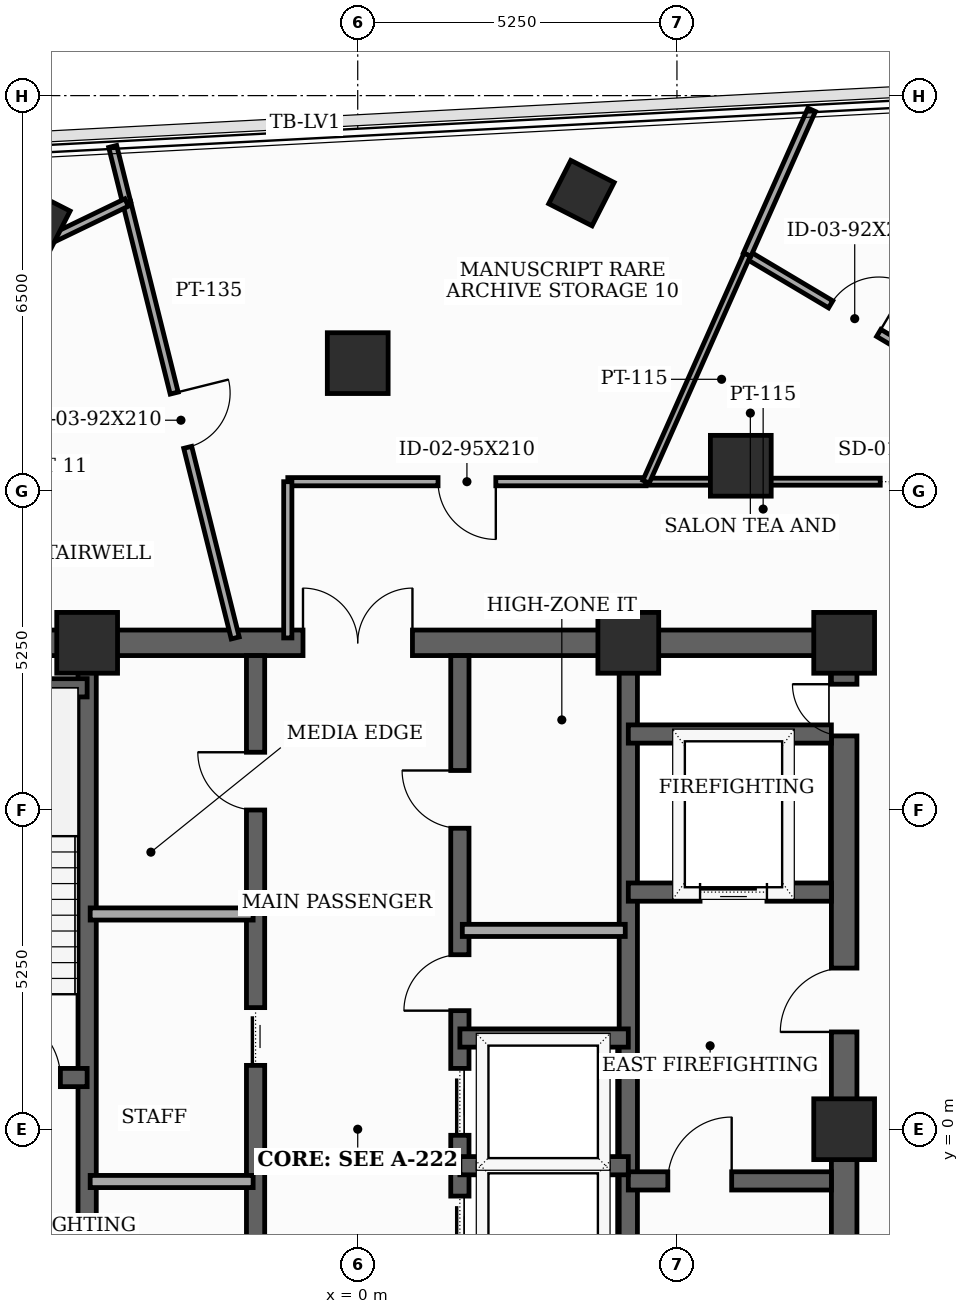
"""IFC4 building model, lengths in metres.
Left out: names, types, materials, properties, quantities, classifications, styles, units other than length and angle.
Written with IfcOpenShell. Run it as: python <this file> out.ifc"""

import sys

from ifc_helpers import new_model, si_unit, direction, frame, frame_2d, origin, origin_2d, place, context, subcontext, project, spatial, rectangle, extrude, element, fill, save


model = new_model("IFC4")
c1 = context("Model", 3, precision=1e-05, world=origin(), true_north=direction((0.0, 1.0)))
c2 = subcontext(c1, "Body", "Model", "MODEL_VIEW")
j1 = project(units=[si_unit("LENGTHUNIT", "METRE"), si_unit("PLANEANGLEUNIT", "RADIAN")], contexts=[c1])
p1 = place(None, origin())
s1 = spatial("IfcSite", under=j1, at=p1, CompositionType="ELEMENT")
p2 = place(p1, origin())
s2 = spatial("IfcBuilding", under=s1, at=p2, CompositionType="ELEMENT")
p3 = place(p2, frame((0.0, 0.0, 255.9)))
s3 = spatial("IfcBuildingStorey", under=s2, at=p3, CompositionType="ELEMENT", Elevation=255.9)
for number, where, z_axis, x_axis in (
    (1, (8.0, 0.0, 0.0), (0.0, 0.0, 1.0), (1.0, 0.0, 0.0)),
    (2, (8.0, 8.0, 0.0), (0.0, 0.0, 1.0), (1.0, 0.0, 0.0)),
    (3, (4.45, 8.0, 0.0), (0.0, 0.0, 1.0), (1.0, 0.0, 0.0)),
    (4, (-4.45, 8.0, 0.0), (0.0, 0.0, 1.0), (1.0, 0.0, 0.0)),
    (5, (6.3, 10.912, 0.0), (0.0, 0.0, 1.0), (1.0, 0.0, 0.0)),
    (6, (0.0, 12.6, 0.0), (0.0, 0.0, 1.0), (1.0, 0.0, 0.0)),
):
    element("IfcColumn", number, at=place(p3, frame(where, z_axis=z_axis, x_axis=x_axis)), inside=s3, PredefinedType="COLUMN", context=c2, shape_type="SweptSolid", body=[
        extrude(rectangle(XDim=1.0, YDim=1.0, at=origin_2d()), origin(), (0.0, 0.0, 1.0), 3.7),
    ])
for number, where, z_axis, x_axis in (
    (7, (3.679, 15.396, 0.0), (0.0, 0.0, 1.0), (0.454, 0.891, 0.0)),
    (8, (-5.269, 14.927, 0.0), (0.0, 0.0, 1.0), (0.454, 0.891, 0.0)),
):
    element("IfcColumn", number, at=place(p3, frame(where, z_axis=z_axis, x_axis=x_axis)), inside=s3, PredefinedType="COLUMN", context=c2, shape_type="SweptSolid", body=[
        extrude(rectangle(XDim=0.8, YDim=0.8, at=origin_2d()), origin(), (0.0, 0.0, 1.0), 3.7),
    ])
p4 = place(p3, frame((8.0, -8.0, 0.0), z_axis=(0.0, 0.0, 1.0), x_axis=(0.0, 1.0, 0.0)))
e9 = element("IfcWall", 9, at=p4, inside=s3, PredefinedType="SHEAR", context=c2, shape_type="SweptSolid", body=[
    extrude(rectangle(XDim=16.0, YDim=0.42, at=frame_2d((8.0, 0.0))), origin(), (0.0, 0.0, 1.0), 3.5),
])
p5 = place(p4, frame((9.6, 0.0, 0.0)))
e10 = element("IfcOpeningElement", 10, at=p5, cuts=e9, PredefinedType="OPENING", context=c2, shape_type="SweptSolid", body=[
    extrude(rectangle(XDim=1.05, YDim=2.15, at=frame_2d((0.525, 1.075))), frame((0.0, 0.22, 0.0), z_axis=(0.0, -1.0, 0.0), x_axis=(1.0, 0.0, 0.0)), (0.0, 0.0, 1.0), 0.44),
])
p6 = place(p4, frame((14.469, 0.0, 0.0)))
e11 = element("IfcOpeningElement", 11, at=p6, cuts=e9, PredefinedType="OPENING", context=c2, shape_type="SweptSolid", body=[
    extrude(rectangle(XDim=0.85, YDim=2.02, at=frame_2d((0.425, 1.01))), frame((0.0, 0.22, 0.0), z_axis=(0.0, -1.0, 0.0), x_axis=(1.0, 0.0, 0.0)), (0.0, 0.0, 1.0), 0.44),
])
p7 = place(p3, frame((-8.0, 8.0, 0.0), z_axis=(0.0, 0.0, 1.0), x_axis=(1.0, 0.0, 0.0)))
e12 = element("IfcWall", 12, at=p7, inside=s3, PredefinedType="SHEAR", context=c2, shape_type="SweptSolid", body=[
    extrude(rectangle(XDim=16.0, YDim=0.42, at=frame_2d((8.0, 0.0))), origin(), (0.0, 0.0, 1.0), 3.5),
])
p8 = place(p7, frame((7.1, 0.0, 0.0)))
e13 = element("IfcOpeningElement", 13, at=p8, cuts=e12, PredefinedType="OPENING", context=c2, shape_type="SweptSolid", body=[
    extrude(rectangle(XDim=1.8, YDim=2.15, at=frame_2d((0.9, 1.075))), frame((0.0, 0.22, 0.0), z_axis=(0.0, -1.0, 0.0), x_axis=(1.0, 0.0, 0.0)), (0.0, 0.0, 1.0), 0.44),
])
for number, where, z_axis, x_axis in (
    (14, (-4.45, -7.79, 0.0), (0.0, 0.0, 1.0), (0.0, 1.0, 0.0)),
    (15, (4.45, -7.79, 0.0), (0.0, 0.0, 1.0), (0.0, 1.0, 0.0)),
):
    element("IfcWall", number, at=place(p3, frame(where, z_axis=z_axis, x_axis=x_axis)), inside=s3, PredefinedType="SHEAR", context=c2, shape_type="SweptSolid", body=[
        extrude(rectangle(XDim=15.58, YDim=0.3, at=frame_2d((7.79, 0.0))), origin(), (0.0, 0.0, 1.0), 3.5),
    ])
p9 = place(p3, frame((-7.79, 0.85, 0.0), z_axis=(0.0, 0.0, 1.0), x_axis=(1.0, 0.0, 0.0)))
e16 = element("IfcWall", 16, at=p9, inside=s3, PredefinedType="SHEAR", context=c2, shape_type="SweptSolid", body=[
    extrude(rectangle(XDim=3.34, YDim=0.3, at=frame_2d((1.67, 0.0))), origin(), (0.0, 0.0, 1.0), 3.5),
])
p10 = place(p9, frame((1.85, 0.0, 0.0)))
e17 = element("IfcOpeningElement", 17, at=p10, cuts=e16, PredefinedType="OPENING", context=c2, shape_type="SweptSolid", body=[
    extrude(rectangle(XDim=1.05, YDim=2.15, at=frame_2d((0.525, 1.075))), frame((0.0, 0.16, 0.0), z_axis=(0.0, -1.0, 0.0), x_axis=(1.0, 0.0, 0.0)), (0.0, 0.0, 1.0), 0.32),
])
p11 = place(p3, frame((-7.79, 7.26, 0.0), z_axis=(0.0, 0.0, 1.0), x_axis=(1.0, 0.0, 0.0)))
e18 = element("IfcWall", 18, at=p11, inside=s3, PredefinedType="SHEAR", context=c2, shape_type="SweptSolid", body=[
    extrude(rectangle(XDim=3.34, YDim=0.3, at=frame_2d((1.67, 0.0))), origin(), (0.0, 0.0, 1.0), 3.5),
])
p12 = place(p3, frame((4.45, -0.85, 0.0), z_axis=(0.0, 0.0, 1.0), x_axis=(1.0, 0.0, 0.0)))
e19 = element("IfcWall", 19, at=p12, inside=s3, PredefinedType="SHEAR", context=c2, shape_type="SweptSolid", body=[
    extrude(rectangle(XDim=3.34, YDim=0.3, at=frame_2d((1.67, 0.0))), origin(), (0.0, 0.0, 1.0), 3.5),
])
p13 = place(p12, frame((0.65, 0.0, 0.0)))
e20 = element("IfcOpeningElement", 20, at=p13, cuts=e19, PredefinedType="OPENING", context=c2, shape_type="SweptSolid", body=[
    extrude(rectangle(XDim=1.05, YDim=2.15, at=frame_2d((0.525, 1.075))), frame((0.0, 0.16, 0.0), z_axis=(0.0, -1.0, 0.0), x_axis=(1.0, 0.0, 0.0)), (0.0, 0.0, 1.0), 0.32),
])
p14 = place(p3, frame((4.45, 3.9, 0.0), z_axis=(0.0, 0.0, 1.0), x_axis=(1.0, 0.0, 0.0)))
e21 = element("IfcWall", 21, at=p14, inside=s3, PredefinedType="SHEAR", context=c2, shape_type="SweptSolid", body=[
    extrude(rectangle(XDim=3.34, YDim=0.3, at=frame_2d((1.67, 0.0))), origin(), (0.0, 0.0, 1.0), 3.5),
])
p15 = place(p14, frame((1.18, 0.0, 0.0)))
e22 = element("IfcOpeningElement", 22, at=p15, cuts=e21, PredefinedType="OPENING", context=c2, shape_type="SweptSolid", body=[
    extrude(rectangle(XDim=1.1, YDim=2.1, at=frame_2d((0.55, 1.05))), frame((0.0, 0.16, 0.0), z_axis=(0.0, -1.0, 0.0), x_axis=(1.0, 0.0, 0.0)), (0.0, 0.0, 1.0), 0.32),
])
p16 = place(p3, frame((4.45, 6.5, 0.0), z_axis=(0.0, 0.0, 1.0), x_axis=(1.0, 0.0, 0.0)))
e23 = element("IfcWall", 23, at=p16, inside=s3, PredefinedType="SHEAR", context=c2, shape_type="SweptSolid", body=[
    extrude(rectangle(XDim=3.34, YDim=0.3, at=frame_2d((1.67, 0.0))), origin(), (0.0, 0.0, 1.0), 3.5),
])
p17 = place(p3, frame((-1.68, -4.85, 0.0), z_axis=(0.0, 0.0, 1.0), x_axis=(0.0, 1.0, 0.0)))
e24 = element("IfcWall", 24, at=p17, inside=s3, PredefinedType="SHEAR", context=c2, shape_type="SweptSolid", body=[
    extrude(rectangle(XDim=12.64, YDim=0.3, at=frame_2d((6.32, 0.0))), origin(), (0.0, 0.0, 1.0), 3.5),
])
p18 = place(p17, frame((1.65, 0.0, 0.0)))
e25 = element("IfcOpeningElement", 25, at=p18, cuts=e24, PredefinedType="OPENING", context=c2, shape_type="SweptSolid", body=[
    extrude(rectangle(XDim=0.95, YDim=2.1, at=frame_2d((0.475, 1.05))), frame((0.0, 0.16, 0.0), z_axis=(0.0, -1.0, 0.0), x_axis=(1.0, 0.0, 0.0)), (0.0, 0.0, 1.0), 0.32),
])
p19 = place(p17, frame((5.9, 0.0, 0.0)))
e26 = element("IfcOpeningElement", 26, at=p19, cuts=e24, PredefinedType="OPENING", context=c2, shape_type="SweptSolid", body=[
    extrude(rectangle(XDim=0.95, YDim=2.1, at=frame_2d((0.475, 1.05))), frame((0.0, 0.16, 0.0), z_axis=(0.0, -1.0, 0.0), x_axis=(1.0, 0.0, 0.0)), (0.0, 0.0, 1.0), 0.32),
])
p20 = place(p17, frame((10.1, 0.0, 0.0)))
e27 = element("IfcOpeningElement", 27, at=p20, cuts=e24, PredefinedType="OPENING", context=c2, shape_type="SweptSolid", body=[
    extrude(rectangle(XDim=0.95, YDim=2.1, at=frame_2d((0.475, 1.05))), frame((0.0, 0.16, 0.0), z_axis=(0.0, -1.0, 0.0), x_axis=(1.0, 0.0, 0.0)), (0.0, 0.0, 1.0), 0.32),
])
p21 = place(p3, frame((1.68, -4.85, 0.0), z_axis=(0.0, 0.0, 1.0), x_axis=(0.0, 1.0, 0.0)))
e28 = element("IfcWall", 28, at=p21, inside=s3, PredefinedType="SHEAR", context=c2, shape_type="SweptSolid", body=[
    extrude(rectangle(XDim=12.64, YDim=0.3, at=frame_2d((6.32, 0.0))), origin(), (0.0, 0.0, 1.0), 3.5),
])
p22 = place(p21, frame((0.55, 0.0, 0.0)))
e29 = element("IfcOpeningElement", 29, at=p22, cuts=e28, PredefinedType="OPENING", context=c2, shape_type="SweptSolid", body=[
    extrude(rectangle(XDim=1.1, YDim=2.1, at=frame_2d((0.55, 1.05))), frame((0.0, 0.16, 0.0), z_axis=(0.0, -1.0, 0.0), x_axis=(1.0, 0.0, 0.0)), (0.0, 0.0, 1.0), 0.32),
])
p23 = place(p21, frame((2.65, 0.0, 0.0)))
e30 = element("IfcOpeningElement", 30, at=p23, cuts=e28, PredefinedType="OPENING", context=c2, shape_type="SweptSolid", body=[
    extrude(rectangle(XDim=1.1, YDim=2.1, at=frame_2d((0.55, 1.05))), frame((0.0, 0.16, 0.0), z_axis=(0.0, -1.0, 0.0), x_axis=(1.0, 0.0, 0.0)), (0.0, 0.0, 1.0), 0.32),
])
p24 = place(p21, frame((4.75, 0.0, 0.0)))
e31 = element("IfcOpeningElement", 31, at=p24, cuts=e28, PredefinedType="OPENING", context=c2, shape_type="SweptSolid", body=[
    extrude(rectangle(XDim=1.1, YDim=2.1, at=frame_2d((0.55, 1.05))), frame((0.0, 0.16, 0.0), z_axis=(0.0, -1.0, 0.0), x_axis=(1.0, 0.0, 0.0)), (0.0, 0.0, 1.0), 0.32),
])
p25 = place(p21, frame((6.8, 0.0, 0.0)))
e32 = element("IfcOpeningElement", 32, at=p25, cuts=e28, PredefinedType="OPENING", context=c2, shape_type="SweptSolid", body=[
    extrude(rectangle(XDim=0.92, YDim=2.1, at=frame_2d((0.46, 1.05))), frame((0.0, 0.16, 0.0), z_axis=(0.0, -1.0, 0.0), x_axis=(1.0, 0.0, 0.0)), (0.0, 0.0, 1.0), 0.32),
])
p26 = place(p21, frame((9.8, 0.0, 0.0)))
e33 = element("IfcOpeningElement", 33, at=p26, cuts=e28, PredefinedType="OPENING", context=c2, shape_type="SweptSolid", body=[
    extrude(rectangle(XDim=0.95, YDim=2.1, at=frame_2d((0.475, 1.05))), frame((0.0, 0.16, 0.0), z_axis=(0.0, -1.0, 0.0), x_axis=(1.0, 0.0, 0.0)), (0.0, 0.0, 1.0), 0.32),
])
for number, where, z_axis, x_axis in (
    (34, (1.68, 1.5, 0.0), (0.0, 0.0, 1.0), (1.0, 0.0, 0.0)),
    (35, (1.68, -0.6, 0.0), (0.0, 0.0, 1.0), (1.0, 0.0, 0.0)),
):
    element("IfcWall", number, at=place(p3, frame(where, z_axis=z_axis, x_axis=x_axis)), inside=s3, PredefinedType="SHEAR", context=c2, shape_type="SweptSolid", body=[
        extrude(rectangle(XDim=2.77, YDim=0.3, at=frame_2d((1.385, 0.0))), origin(), (0.0, 0.0, 1.0), 3.5),
    ])
for number, where, z_axis, x_axis in (
    (36, (-4.4, -0.86, 0.0), (0.0, 0.0, 1.0), (1.0, 0.0, 0.0)),
    (37, (-4.4, 3.54, 0.0), (0.0, 0.0, 1.0), (1.0, 0.0, 0.0)),
    (38, (1.72, 3.27, 0.0), (0.0, 0.0, 1.0), (1.0, 0.0, 0.0)),
):
    element("IfcWall", number, at=place(p3, frame(where, z_axis=z_axis, x_axis=x_axis)), inside=s3, PredefinedType="SOLIDWALL", context=c2, shape_type="SweptSolid", body=[
        extrude(rectangle(XDim=2.68, YDim=0.2, at=frame_2d((1.34, 0.0))), origin(), (0.0, 0.0, 1.0), 3.5),
    ])
p27 = place(p3, frame((10.15, 10.65, 0.0), z_axis=(0.0, 0.0, 1.0), x_axis=(-1.0, 0.0, 0.0)))
e39 = element("IfcWall", 39, at=p27, inside=s3, PredefinedType="PARTITIONING", context=c2, shape_type="SweptSolid", body=[
    extrude(rectangle(XDim=5.408, YDim=0.115, at=frame_2d((2.704, 0.0))), origin(), (0.0, 0.0, 1.0), 2.885),
])
p28 = place(p27, frame((0.607, 0.0, 0.0)))
e40 = element("IfcOpeningElement", 40, at=p28, cuts=e39, PredefinedType="OPENING", context=c2, shape_type="SweptSolid", body=[
    extrude(rectangle(XDim=0.95, YDim=2.1, at=frame_2d((0.475, 1.05))), frame((0.0, 0.067, 0.0), z_axis=(0.0, -1.0, 0.0), x_axis=(1.0, 0.0, 0.0)), (0.0, 0.0, 1.0), 0.135),
])
p29 = place(p3, frame((4.742, 10.65, 0.0), z_axis=(0.0, 0.0, 1.0), x_axis=(-1.0, 0.0, 0.0)))
e41 = element("IfcWall", 41, at=p29, inside=s3, PredefinedType="PARTITIONING", context=c2, shape_type="SweptSolid", body=[
    extrude(rectangle(XDim=5.892, YDim=0.135, at=frame_2d((2.946, 0.0))), origin(), (0.0, 0.0, 1.0), 2.885),
])
p30 = place(p29, frame((2.471, 0.0, 0.0)))
e42 = element("IfcOpeningElement", 42, at=p30, cuts=e41, PredefinedType="OPENING", context=c2, shape_type="SweptSolid", body=[
    extrude(rectangle(XDim=0.95, YDim=2.1, at=frame_2d((0.475, 1.05))), frame((0.0, 0.077, 0.0), z_axis=(0.0, -1.0, 0.0), x_axis=(1.0, 0.0, 0.0)), (0.0, 0.0, 1.0), 0.155),
])
p31 = place(p3, frame((-1.15, 10.65, 0.0), z_axis=(0.0, 0.0, 1.0), x_axis=(0.0, -1.0, 0.0)))
e43 = element("IfcWall", 43, at=p31, inside=s3, PredefinedType="PARTITIONING", context=c2, shape_type="SweptSolid", body=[
    extrude(rectangle(XDim=2.57, YDim=0.135, at=frame_2d((1.285, 0.0))), origin(), (0.0, 0.0, 1.0), 2.885),
])
p32 = place(p3, frame((6.404, 14.384, 0.0), z_axis=(0.0, 0.0, 1.0), x_axis=(0.859464079119, -0.511196143085, 0.0)))
e44 = element("IfcWall", 44, at=p32, inside=s3, PredefinedType="PARTITIONING", context=c2, shape_type="SweptSolid", body=[
    extrude(rectangle(XDim=4.118, YDim=0.135, at=frame_2d((2.059, 0.0))), origin(), (0.0, 0.0, 1.0), 3.035),
])
p33 = place(p32, frame((1.599, 0.0, 0.0)))
e45 = element("IfcOpeningElement", 45, at=p33, cuts=e44, PredefinedType="OPENING", context=c2, shape_type="SweptSolid", body=[
    extrude(rectangle(XDim=0.92, YDim=2.1, at=frame_2d((0.46, 1.05))), frame((0.0, 0.077, 0.0), z_axis=(0.0, -1.0, 0.0), x_axis=(1.0, 0.0, 0.0)), (0.0, 0.0, 1.0), 0.155),
])
p34 = place(p3, frame((7.465, 16.766, 0.0), z_axis=(0.0, 0.0, 1.0), x_axis=(-0.406928703069, -0.913459922831, 0.0)))
e46 = element("IfcWall", 46, at=p34, inside=s3, PredefinedType="PARTITIONING", context=c2, shape_type="SweptSolid", body=[
    extrude(rectangle(XDim=2.608, YDim=0.135, at=frame_2d((1.304, 0.0))), origin(), (0.0, 0.0, 1.0), 3.035),
])
p35 = place(p3, frame((6.404, 14.384, 0.0), z_axis=(0.0, 0.0, 1.0), x_axis=(-0.406648271104, -0.913584798258, 0.0)))
e47 = element("IfcWall", 47, at=p35, inside=s3, PredefinedType="PARTITIONING", context=c2, shape_type="SweptSolid", body=[
    extrude(rectangle(XDim=4.087, YDim=0.115, at=frame_2d((2.044, 0.0))), origin(), (0.0, 0.0, 1.0), 2.885),
])
p36 = place(p3, frame((-3.8, 15.242, 0.0), z_axis=(0.0, 0.0, 1.0), x_axis=(0.241889603588, -0.970303777008, 0.0)))
e48 = element("IfcWall", 48, at=p36, inside=s3, PredefinedType="PARTITIONING", context=c2, shape_type="SweptSolid", body=[
    extrude(rectangle(XDim=7.381, YDim=0.135, at=frame_2d((3.69, 0.0))), origin(), (0.0, 0.0, 1.0), 2.885),
])
p37 = place(p36, frame((3.231, 0.0, 0.0)))
e49 = element("IfcOpeningElement", 49, at=p37, cuts=e48, PredefinedType="OPENING", context=c2, shape_type="SweptSolid", body=[
    extrude(rectangle(XDim=0.92, YDim=2.1, at=frame_2d((0.46, 1.05))), frame((0.0, 0.077, 0.0), z_axis=(0.0, -1.0, 0.0), x_axis=(1.0, 0.0, 0.0)), (0.0, 0.0, 1.0), 0.155),
])
p38 = place(p3, frame((-4.03, 16.164, 0.0), z_axis=(0.0, 0.0, 1.0), x_axis=(0.241809991188, -0.970323620326, 0.0)))
e50 = element("IfcWall", 50, at=p38, inside=s3, PredefinedType="PARTITIONING", context=c2, shape_type="SweptSolid", body=[
    extrude(rectangle(XDim=0.95, YDim=0.135, at=frame_2d((0.475, 0.0))), origin(), (0.0, 0.0, 1.0), 3.5),
])
p39 = place(p3, frame((-3.8, 15.242, 0.0), z_axis=(0.0, 0.0, 1.0), x_axis=(-0.900708156853, -0.434424695635, 0.0)))
e51 = element("IfcWall", 51, at=p39, inside=s3, PredefinedType="PARTITIONING", context=c2, shape_type="SweptSolid", body=[
    extrude(rectangle(XDim=6.82, YDim=0.135, at=frame_2d((3.41, 0.0))), origin(), (0.0, 0.0, 1.0), 3.035),
])
p40 = place(p5, origin())
e52 = element("IfcDoor", 52, at=p40, inside=s3, OperationType="SINGLE_SWING_LEFT", PredefinedType="DOOR", context=c2, shape_type="SweptSolid", body=[
    extrude(rectangle(XDim=1.05, YDim=2.15, at=frame_2d((0.525, 1.075))), frame((0.0, 0.025, 0.0), z_axis=(0.0, -1.0, 0.0), x_axis=(1.0, 0.0, 0.0)), (0.0, 0.0, 1.0), 0.05),
])
fill(e10, e52)
p41 = place(p6, origin())
e53 = element("IfcDoor", 53, at=p41, inside=s3, OperationType="SINGLE_SWING_RIGHT", PredefinedType="TRAPDOOR", context=c2, shape_type="SweptSolid", body=[
    extrude(rectangle(XDim=0.85, YDim=2.02, at=frame_2d((0.425, 1.01))), frame((0.0, 0.025, 0.0), z_axis=(0.0, -1.0, 0.0), x_axis=(1.0, 0.0, 0.0)), (0.0, 0.0, 1.0), 0.05),
])
fill(e11, e53)
p42 = place(p8, origin())
e54 = element("IfcDoor", 54, at=p42, inside=s3, OperationType="DOUBLE_DOOR_SINGLE_SWING", PredefinedType="DOOR", context=c2, shape_type="SweptSolid", body=[
    extrude(rectangle(XDim=1.8, YDim=2.15, at=frame_2d((0.9, 1.075))), frame((0.0, 0.025, 0.0), z_axis=(0.0, -1.0, 0.0), x_axis=(1.0, 0.0, 0.0)), (0.0, 0.0, 1.0), 0.05),
])
fill(e13, e54)
p43 = place(p10, origin())
e55 = element("IfcDoor", 55, at=p43, inside=s3, OperationType="SINGLE_SWING_LEFT", PredefinedType="DOOR", context=c2, shape_type="SweptSolid", body=[
    extrude(rectangle(XDim=1.05, YDim=2.15, at=frame_2d((0.525, 1.075))), frame((0.0, 0.025, 0.0), z_axis=(0.0, -1.0, 0.0), x_axis=(1.0, 0.0, 0.0)), (0.0, 0.0, 1.0), 0.05),
])
fill(e17, e55)
p44 = place(p13, origin())
e56 = element("IfcDoor", 56, at=p44, inside=s3, OperationType="SINGLE_SWING_RIGHT", PredefinedType="DOOR", context=c2, shape_type="SweptSolid", body=[
    extrude(rectangle(XDim=1.05, YDim=2.15, at=frame_2d((0.525, 1.075))), frame((0.0, 0.025, 0.0), z_axis=(0.0, -1.0, 0.0), x_axis=(1.0, 0.0, 0.0)), (0.0, 0.0, 1.0), 0.05),
])
fill(e20, e56)
p45 = place(p15, origin())
e57 = element("IfcDoor", 57, at=p45, inside=s3, OperationType="SLIDING_TO_LEFT", PredefinedType="DOOR", context=c2, shape_type="SweptSolid", body=[
    extrude(rectangle(XDim=1.1, YDim=2.1, at=frame_2d((0.55, 1.05))), frame((0.0, 0.025, 0.0), z_axis=(0.0, -1.0, 0.0), x_axis=(1.0, 0.0, 0.0)), (0.0, 0.0, 1.0), 0.05),
])
fill(e22, e57)
p46 = place(p19, origin())
e58 = element("IfcDoor", 58, at=p46, inside=s3, OperationType="SLIDING_TO_LEFT", PredefinedType="DOOR", context=c2, shape_type="SweptSolid", body=[
    extrude(rectangle(XDim=0.95, YDim=2.1, at=frame_2d((0.475, 1.05))), frame((0.0, 0.025, 0.0), z_axis=(0.0, -1.0, 0.0), x_axis=(1.0, 0.0, 0.0)), (0.0, 0.0, 1.0), 0.05),
])
fill(e26, e58)
p47 = place(p20, origin())
e59 = element("IfcDoor", 59, at=p47, inside=s3, OperationType="SINGLE_SWING_RIGHT", PredefinedType="DOOR", context=c2, shape_type="SweptSolid", body=[
    extrude(rectangle(XDim=0.95, YDim=2.1, at=frame_2d((0.475, 1.05))), frame((0.0, 0.025, 0.0), z_axis=(0.0, -1.0, 0.0), x_axis=(1.0, 0.0, 0.0)), (0.0, 0.0, 1.0), 0.05),
])
fill(e27, e59)
p48 = place(p23, origin())
e60 = element("IfcDoor", 60, at=p48, inside=s3, OperationType="SLIDING_TO_LEFT", PredefinedType="DOOR", context=c2, shape_type="SweptSolid", body=[
    extrude(rectangle(XDim=1.1, YDim=2.1, at=frame_2d((0.55, 1.05))), frame((0.0, 0.025, 0.0), z_axis=(0.0, -1.0, 0.0), x_axis=(1.0, 0.0, 0.0)), (0.0, 0.0, 1.0), 0.05),
])
fill(e30, e60)
p49 = place(p24, origin())
e61 = element("IfcDoor", 61, at=p49, inside=s3, OperationType="SLIDING_TO_LEFT", PredefinedType="DOOR", context=c2, shape_type="SweptSolid", body=[
    extrude(rectangle(XDim=1.1, YDim=2.1, at=frame_2d((0.55, 1.05))), frame((0.0, 0.025, 0.0), z_axis=(0.0, -1.0, 0.0), x_axis=(1.0, 0.0, 0.0)), (0.0, 0.0, 1.0), 0.05),
])
fill(e31, e61)
p50 = place(p25, origin())
e62 = element("IfcDoor", 62, at=p50, inside=s3, OperationType="SINGLE_SWING_LEFT", PredefinedType="DOOR", context=c2, shape_type="SweptSolid", body=[
    extrude(rectangle(XDim=0.92, YDim=2.1, at=frame_2d((0.46, 1.05))), frame((0.0, 0.025, 0.0), z_axis=(0.0, -1.0, 0.0), x_axis=(1.0, 0.0, 0.0)), (0.0, 0.0, 1.0), 0.05),
])
fill(e32, e62)
p51 = place(p26, origin())
e63 = element("IfcDoor", 63, at=p51, inside=s3, OperationType="SINGLE_SWING_RIGHT", PredefinedType="DOOR", context=c2, shape_type="SweptSolid", body=[
    extrude(rectangle(XDim=0.95, YDim=2.1, at=frame_2d((0.475, 1.05))), frame((0.0, 0.025, 0.0), z_axis=(0.0, -1.0, 0.0), x_axis=(1.0, 0.0, 0.0)), (0.0, 0.0, 1.0), 0.05),
])
fill(e33, e63)
p52 = place(p28, origin())
e64 = element("IfcDoor", 64, at=p52, inside=s3, OperationType="SLIDING_TO_LEFT", PredefinedType="DOOR", context=c2, shape_type="SweptSolid", body=[
    extrude(rectangle(XDim=0.95, YDim=2.1, at=frame_2d((0.475, 1.05))), frame((0.0, 0.025, 0.0), z_axis=(0.0, -1.0, 0.0), x_axis=(1.0, 0.0, 0.0)), (0.0, 0.0, 1.0), 0.05),
])
fill(e40, e64)
p53 = place(p30, origin())
e65 = element("IfcDoor", 65, at=p53, inside=s3, OperationType="SINGLE_SWING_LEFT", PredefinedType="DOOR", context=c2, shape_type="SweptSolid", body=[
    extrude(rectangle(XDim=0.95, YDim=2.1, at=frame_2d((0.475, 1.05))), frame((0.0, 0.025, 0.0), z_axis=(0.0, -1.0, 0.0), x_axis=(1.0, 0.0, 0.0)), (0.0, 0.0, 1.0), 0.05),
])
fill(e42, e65)
p54 = place(p33, origin())
e66 = element("IfcDoor", 66, at=p54, inside=s3, OperationType="SINGLE_SWING_RIGHT", PredefinedType="DOOR", context=c2, shape_type="SweptSolid", body=[
    extrude(rectangle(XDim=0.92, YDim=2.1, at=frame_2d((0.46, 1.05))), frame((0.0, 0.025, 0.0), z_axis=(0.0, -1.0, 0.0), x_axis=(1.0, 0.0, 0.0)), (0.0, 0.0, 1.0), 0.05),
])
fill(e45, e66)
p55 = place(p37, origin())
e67 = element("IfcDoor", 67, at=p55, inside=s3, OperationType="SINGLE_SWING_LEFT", PredefinedType="DOOR", context=c2, shape_type="SweptSolid", body=[
    extrude(rectangle(XDim=0.92, YDim=2.1, at=frame_2d((0.46, 1.05))), frame((0.0, 0.025, 0.0), z_axis=(0.0, -1.0, 0.0), x_axis=(1.0, 0.0, 0.0)), (0.0, 0.0, 1.0), 0.05),
])
fill(e49, e67)
save(model, sys.argv[1])
